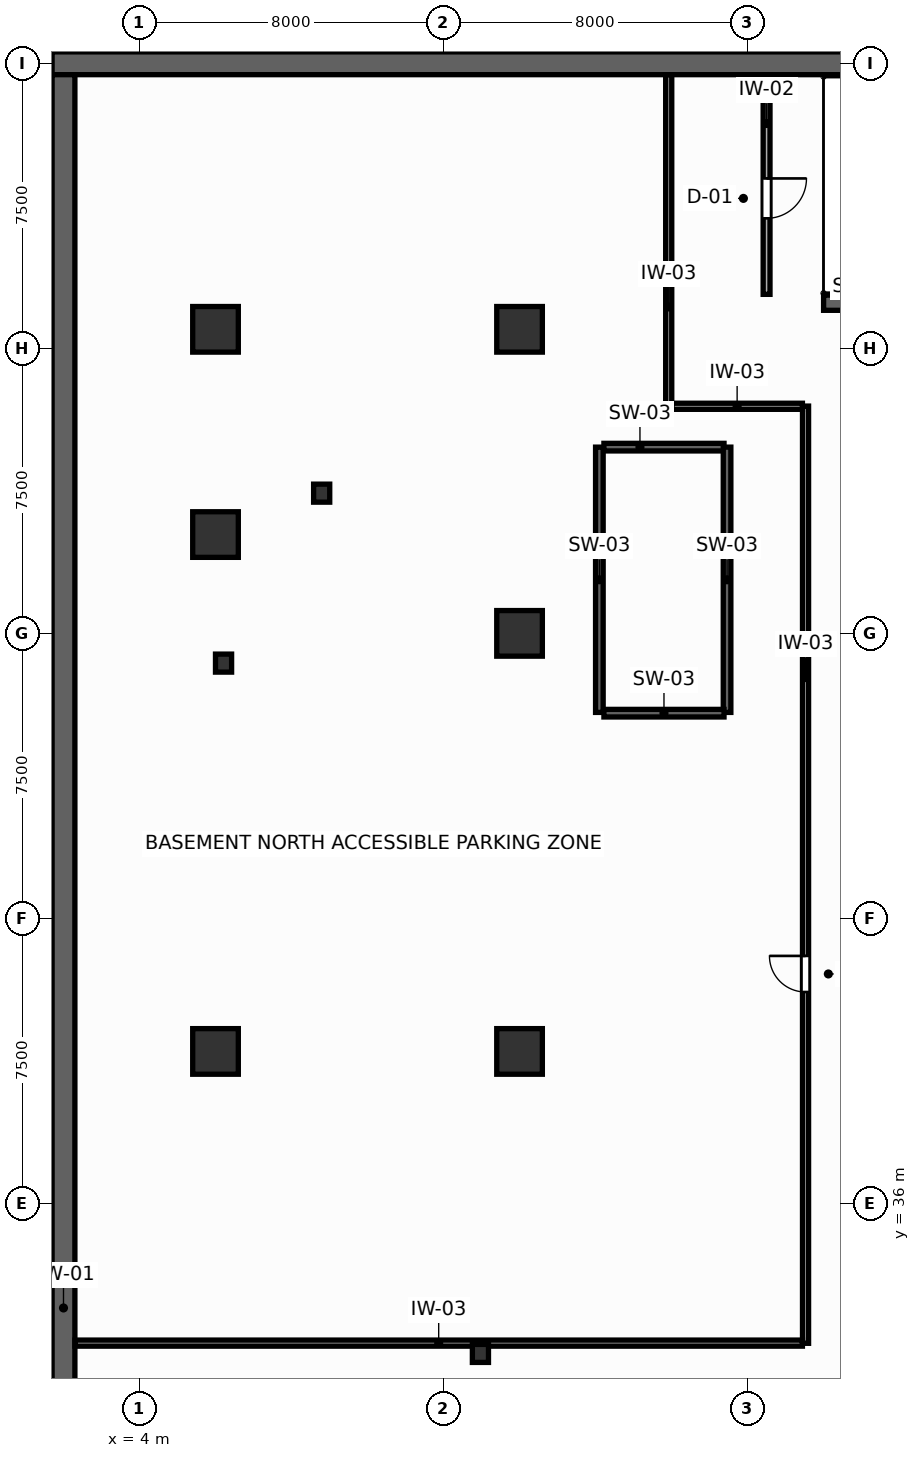
"""IFC4 building model, lengths in metres.
Left out: names, types, materials, properties, quantities, classifications, styles, units other than length and angle.
Written with IfcOpenShell. Run it as: python <this file> out.ifc"""

import sys

from ifc_helpers import new_model, si_unit, direction, frame, frame_2d, origin, origin_2d, place, context, subcontext, project, spatial, rectangle, i_section, extrude, source, transform, mapped, element, fill, save


model = new_model("IFC4")
c1 = context("Model", 3, precision=1e-05, world=origin(), true_north=direction((0.0, 1.0)))
c2 = subcontext(c1, "Body", "Model", "MODEL_VIEW")
j1 = project(units=[si_unit("LENGTHUNIT", "METRE"), si_unit("PLANEANGLEUNIT", "RADIAN")], contexts=[c1])
p1 = place(None, origin())
s1 = spatial("IfcSite", under=j1, at=p1, CompositionType="ELEMENT")
p2 = place(p1, origin())
s2 = spatial("IfcBuilding", under=s1, at=p2, CompositionType="ELEMENT")
p3 = place(p2, frame((0.0, 0.0, -4.5)))
s3 = spatial("IfcBuildingStorey", under=s2, at=p3, CompositionType="ELEMENT", Elevation=-4.5)
p4 = place(p3, frame((1.7, 66.0, 0.0), z_axis=(0.0, 0.0, 1.0), x_axis=(1.0, 0.0, 0.0)))
e1 = element("IfcWall", 1, at=p4, inside=s3, PredefinedType="SOLIDWALL", context=c2, shape_type="SweptSolid", body=[
    extrude(rectangle(XDim=87.98, YDim=0.6, at=frame_2d((43.99, 0.0))), origin(), (0.0, 0.0, 1.0), 4.5),
])
p5 = place(p3, frame((22.0, 59.7, 0.0), z_axis=(0.0, 0.0, 1.0), x_axis=(1.0, 0.0, 0.0)))
e2 = element("IfcWall", 2, at=p5, inside=s3, PredefinedType="SOLIDWALL", context=c2, shape_type="SweptSolid", body=[
    extrude(rectangle(XDim=35.8, YDim=0.4, at=frame_2d((17.9, 0.0))), origin(), (0.0, 0.0, 1.0), 4.22),
])
p6 = place(p3, frame((2.0, 0.8, 0.0), z_axis=(0.0, 0.0, 1.0), x_axis=(0.0, 1.0, 0.0)))
e3 = element("IfcWall", 3, at=p6, inside=s3, PredefinedType="SOLIDWALL", context=c2, shape_type="SweptSolid", body=[
    extrude(rectangle(XDim=64.9, YDim=0.6, at=frame_2d((32.45, 0.0))), origin(), (0.0, 0.0, 1.0), 4.5),
])
p7 = place(p3, frame((16.1, 48.92, 0.0), z_axis=(0.0, 0.0, 1.0), x_axis=(0.0, 1.0, 0.0)))
e4 = element("IfcWall", 4, at=p7, inside=s3, PredefinedType="SHEAR", context=c2, shape_type="SweptSolid", body=[
    extrude(rectangle(XDim=6.98, YDim=0.2, at=frame_2d((3.49, 0.0))), origin(), (0.0, 0.0, 1.0), 4.5),
])
p8 = place(p3, frame((16.22, 55.9, 0.0), z_axis=(0.0, 0.0, 1.0), x_axis=(1.0, 0.0, 0.0)))
e5 = element("IfcWall", 5, at=p8, inside=s3, PredefinedType="SHEAR", context=c2, shape_type="SweptSolid", body=[
    extrude(rectangle(XDim=3.16, YDim=0.2, at=frame_2d((1.58, 0.0))), origin(), (0.0, 0.0, 1.0), 4.5),
])
p9 = place(p3, frame((19.46, 48.92, 0.0), z_axis=(0.0, 0.0, 1.0), x_axis=(0.0, 1.0, 0.0)))
e6 = element("IfcWall", 6, at=p9, inside=s3, PredefinedType="SHEAR", context=c2, shape_type="SweptSolid", body=[
    extrude(rectangle(XDim=6.98, YDim=0.2, at=frame_2d((3.49, 0.0))), origin(), (0.0, 0.0, 1.0), 4.5),
])
p10 = place(p3, frame((16.22, 48.9, 0.0), z_axis=(0.0, 0.0, 1.0), x_axis=(1.0, 0.0, 0.0)))
e7 = element("IfcWall", 7, at=p10, inside=s3, PredefinedType="SHEAR", context=c2, shape_type="SweptSolid", body=[
    extrude(rectangle(XDim=3.16, YDim=0.2, at=frame_2d((1.58, 0.0))), origin(), (0.0, 0.0, 1.0), 4.5),
])
m1 = source(origin(), c2, "Body", "SweptSolid", [
    extrude(rectangle(XDim=1.2, YDim=1.2, at=origin_2d()), origin(), (0.0, 0.0, 1.0), 4.5),
])
for number, where, z_axis, x_axis in (
    (8, (6.0, 40.0, 0.0), (0.0, 0.0, 1.0), (1.0, 0.0, 0.0)),
    (9, (6.0, 53.6, 0.0), (0.0, 0.0, 1.0), (1.0, 0.0, 0.0)),
    (10, (6.0, 59.0, 0.0), (0.0, 0.0, 1.0), (1.0, 0.0, 0.0)),
    (11, (14.0, 59.0, 0.0), (0.0, 0.0, 1.0), (1.0, 0.0, 0.0)),
    (12, (14.0, 40.0, 0.0), (0.0, 0.0, 1.0), (1.0, 0.0, 0.0)),
    (13, (14.0, 51.0, 0.0), (0.0, 0.0, 1.0), (1.0, 0.0, 0.0)),
):
    element("IfcColumn", number, at=place(p3, frame(where, z_axis=z_axis, x_axis=x_axis)), inside=s3, PredefinedType="COLUMN", context=c2, shape_type="MappedRepresentation", body=[
        mapped(m1, transform((0.0, 0.0, 0.0), scale=1.0)),
    ])
m2 = source(origin(), c2, "Body", "SweptSolid", [
    extrude(i_section(OverallWidth=0.424, OverallDepth=0.474, WebThickness=0.045, FlangeThickness=0.072, FilletRadius=0.015, at=origin_2d()), origin(), (0.0, 0.0, 1.0), 4.5),
])
for number, where, z_axis, x_axis in (
    (14, (8.793, 54.689, 0.0), (0.0, 0.0, 1.0), (1.0, 0.0, 0.0)),
    (15, (6.211, 50.217, 0.0), (0.0, 0.0, 1.0), (1.0, 0.0, 0.0)),
    (16, (12.97, 32.054, 0.0), (0.0, 0.0, 1.0), (1.0, 0.0, 0.0)),
):
    element("IfcColumn", number, at=place(p3, frame(where, z_axis=z_axis, x_axis=x_axis)), inside=s3, PredefinedType="COLUMN", context=c2, shape_type="MappedRepresentation", body=[
        mapped(m2, transform((0.0, 0.0, 0.0), scale=1.0)),
    ])
p11 = place(p3, frame((20.5, 59.92, 0.0), z_axis=(0.0, 0.0, 1.0), x_axis=(0.0, 1.0, 0.0)))
e17 = element("IfcWall", 17, at=p11, inside=s3, PredefinedType="PARTITIONING", context=c2, shape_type="SweptSolid", body=[
    extrude(rectangle(XDim=5.76, YDim=0.18, at=frame_2d((2.88, 0.0))), origin(), (0.0, 0.0, 1.0), 4.22),
])
p12 = place(p11, frame((2.0, 0.0, 0.0)))
e18 = element("IfcOpeningElement", 18, at=p12, cuts=e17, PredefinedType="OPENING", context=c2, shape_type="SweptSolid", body=[
    extrude(rectangle(XDim=1.05, YDim=2.1, at=frame_2d((0.525, 1.05))), frame((0.0, 0.1, 0.0), z_axis=(0.0, -1.0, 0.0), x_axis=(1.0, 0.0, 0.0)), (0.0, 0.0, 1.0), 0.2),
])
p13 = place(p3, frame((21.525, 32.32, 0.0), z_axis=(0.0, 0.0, 1.0), x_axis=(0.0, 1.0, 0.0)))
e19 = element("IfcWall", 19, at=p13, inside=s3, PredefinedType="PARTITIONING", context=c2, shape_type="SweptSolid", body=[
    extrude(rectangle(XDim=24.66, YDim=0.16, at=frame_2d((12.33, 0.0))), origin(), (0.0, 0.0, 1.0), 4.22),
])
p14 = place(p13, frame((9.243, 0.0, 0.0)))
e20 = element("IfcOpeningElement", 20, at=p14, cuts=e19, PredefinedType="OPENING", context=c2, shape_type="SweptSolid", body=[
    extrude(rectangle(XDim=0.95, YDim=2.05, at=frame_2d((0.475, 1.025))), frame((0.0, 0.09, 0.0), z_axis=(0.0, -1.0, 0.0), x_axis=(1.0, 0.0, 0.0)), (0.0, 0.0, 1.0), 0.18),
])
p15 = place(p3, frame((2.302, 32.325, 0.0), z_axis=(0.0, 0.0, 1.0), x_axis=(1.0, 0.0, 0.0)))
e21 = element("IfcWall", 21, at=p15, inside=s3, PredefinedType="PARTITIONING", context=c2, shape_type="SweptSolid", body=[
    extrude(rectangle(XDim=19.141, YDim=0.16, at=frame_2d((9.571, 0.0))), origin(), (0.0, 0.0, 1.0), 3.52),
])
p16 = place(p3, frame((17.925, 56.97, 0.0), z_axis=(0.0, 0.0, 1.0), x_axis=(0.0, 1.0, 0.0)))
e22 = element("IfcWall", 22, at=p16, inside=s3, PredefinedType="PARTITIONING", context=c2, shape_type="SweptSolid", body=[
    extrude(rectangle(XDim=8.728, YDim=0.16, at=frame_2d((4.364, 0.0))), origin(), (0.0, 0.0, 1.0), 4.22),
])
p17 = place(p3, frame((18.007, 56.975, 0.0), z_axis=(0.0, 0.0, 1.0), x_axis=(1.0, 0.0, 0.0)))
e23 = element("IfcWall", 23, at=p17, inside=s3, PredefinedType="PARTITIONING", context=c2, shape_type="SweptSolid", body=[
    extrude(rectangle(XDim=3.436, YDim=0.16, at=frame_2d((1.718, 0.0))), origin(), (0.0, 0.0, 1.0), 4.22),
])
p18 = place(p12, frame((1.05, 0.0, 0.0), z_axis=(0.0, 0.0, 1.0), x_axis=(-1.0, 0.0, 0.0)))
e24 = element("IfcDoor", 24, at=p18, inside=s3, OperationType="SINGLE_SWING_LEFT", PredefinedType="DOOR", context=c2, shape_type="SweptSolid", body=[
    extrude(rectangle(XDim=1.05, YDim=2.1, at=frame_2d((0.525, 1.05))), frame((0.0, 0.025, 0.0), z_axis=(0.0, -1.0, 0.0), x_axis=(1.0, 0.0, 0.0)), (0.0, 0.0, 1.0), 0.05),
])
fill(e18, e24)
p19 = place(p14, origin())
e25 = element("IfcDoor", 25, at=p19, inside=s3, OperationType="SINGLE_SWING_RIGHT", PredefinedType="DOOR", context=c2, shape_type="SweptSolid", body=[
    extrude(rectangle(XDim=0.95, YDim=2.05, at=frame_2d((0.475, 1.025))), frame((0.0, 0.025, 0.0), z_axis=(0.0, -1.0, 0.0), x_axis=(1.0, 0.0, 0.0)), (0.0, 0.0, 1.0), 0.05),
])
fill(e20, e25)
save(model, sys.argv[1])
